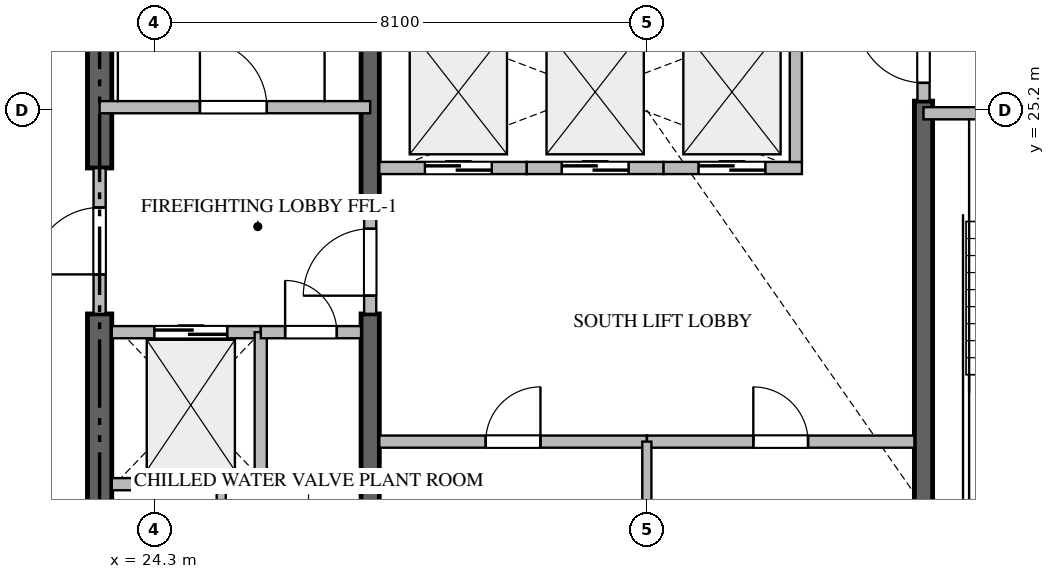
"""IFC4 building model, lengths in metres.
Left out: names, types, materials, properties, quantities, classifications, styles, units other than length and angle.
Written with IfcOpenShell. Run it as: python <this file> out.ifc"""

import sys

from ifc_helpers import new_model, si_unit, direction, frame, frame_2d, origin, place, context, subcontext, project, spatial, rectangle, extrude, source, transform, mapped, element, fill, save


model = new_model("IFC4")
c1 = context("Model", 3, precision=1e-05, world=origin(), true_north=direction((0.0, 1.0)))
c2 = subcontext(c1, "Body", "Model", "MODEL_VIEW")
j1 = project(units=[si_unit("LENGTHUNIT", "METRE"), si_unit("PLANEANGLEUNIT", "RADIAN")], contexts=[c1])
p1 = place(None, origin())
s1 = spatial("IfcSite", under=j1, at=p1, CompositionType="ELEMENT")
p2 = place(p1, origin())
s2 = spatial("IfcBuilding", under=s1, at=p2, CompositionType="ELEMENT")
p3 = place(p2, frame((0.0, 0.0, 157.65)))
s3 = spatial("IfcBuildingStorey", under=s2, at=p3, CompositionType="ELEMENT", Elevation=157.65)
p4 = place(p3, frame((23.4, 17.0, -0.26), z_axis=(0.0, 0.0, 1.0), x_axis=(0.0, 1.0, 0.0)))
e1 = element("IfcWall", 1, at=p4, inside=s3, PredefinedType="SHEAR", context=c2, shape_type="SweptSolid", body=[
    extrude(rectangle(XDim=4.85, YDim=0.4, at=frame_2d((2.425, 0.0))), origin(), (0.0, 0.0, 1.0), 3.748),
])
p5 = place(p3, frame((23.4, 24.25, -0.26), z_axis=(0.0, 0.0, 1.0), x_axis=(0.0, 1.0, 0.0)))
e2 = element("IfcWall", 2, at=p5, inside=s3, PredefinedType="SHEAR", context=c2, shape_type="SweptSolid", body=[
    extrude(rectangle(XDim=9.15, YDim=0.4, at=frame_2d((4.575, 0.0))), origin(), (0.0, 0.0, 1.0), 3.748),
])
p6 = place(p3, frame((27.85, 17.0, -0.26), z_axis=(0.0, 0.0, 1.0), x_axis=(0.0, 1.0, 0.0)))
e3 = element("IfcWall", 3, at=p6, inside=s3, PredefinedType="SHEAR", context=c2, shape_type="SweptSolid", body=[
    extrude(rectangle(XDim=4.85, YDim=0.3, at=frame_2d((2.425, 0.0))), origin(), (0.0, 0.0, 1.0), 3.748),
])
p7 = place(p3, frame((27.85, 23.55, -0.26), z_axis=(0.0, 0.0, 1.0), x_axis=(0.0, 1.0, 0.0)))
e4 = element("IfcWall", 4, at=p7, inside=s3, PredefinedType="SHEAR", context=c2, shape_type="SweptSolid", body=[
    extrude(rectangle(XDim=9.85, YDim=0.3, at=frame_2d((4.925, 0.0))), origin(), (0.0, 0.0, 1.0), 3.748),
])
p8 = place(p3, frame((36.95, 17.0, -0.26), z_axis=(0.0, 0.0, 1.0), x_axis=(0.0, 1.0, 0.0)))
e5 = element("IfcWall", 5, at=p8, inside=s3, PredefinedType="SHEAR", context=c2, shape_type="SweptSolid", body=[
    extrude(rectangle(XDim=8.35, YDim=0.3, at=frame_2d((4.175, 0.0))), origin(), (0.0, 0.0, 1.0), 3.748),
])
p9 = place(p3, frame((23.4, 25.25, 0.0), z_axis=(0.0, 0.0, 1.0), x_axis=(1.0, 0.0, 0.0)))
e6 = element("IfcWall", 6, at=p9, inside=s3, PredefinedType="STANDARD", context=c2, shape_type="SweptSolid", body=[
    extrude(rectangle(XDim=4.45, YDim=0.2, at=frame_2d((2.225, 0.0))), origin(), (0.0, 0.0, 1.0), 3.49),
])
p10 = place(p9, frame((1.65, 0.0, 0.0)))
e7 = element("IfcOpeningElement", 7, at=p10, cuts=e6, PredefinedType="OPENING", context=c2, shape_type="SweptSolid", body=[
    extrude(rectangle(XDim=1.1, YDim=2.15, at=frame_2d((0.55, 1.075))), frame((0.0, 0.11, 0.0), z_axis=(0.0, -1.0, 0.0), x_axis=(1.0, 0.0, 0.0)), (0.0, 0.0, 1.0), 0.22),
])
p11 = place(p3, frame((36.95, 25.15, 0.0), z_axis=(0.0, 0.0, 1.0), x_axis=(1.0, 0.0, 0.0)))
e8 = element("IfcWall", 8, at=p11, inside=s3, PredefinedType="STANDARD", context=c2, shape_type="SweptSolid", body=[
    extrude(rectangle(XDim=4.45, YDim=0.2, at=frame_2d((2.225, 0.0))), origin(), (0.0, 0.0, 1.0), 3.49),
])
p12 = place(p11, frame((1.65, 0.0, 0.0)))
e9 = element("IfcOpeningElement", 9, at=p12, cuts=e8, PredefinedType="OPENING", context=c2, shape_type="SweptSolid", body=[
    extrude(rectangle(XDim=1.1, YDim=2.15, at=frame_2d((0.55, 1.075))), frame((0.0, 0.11, 0.0), z_axis=(0.0, -1.0, 0.0), x_axis=(1.0, 0.0, 0.0)), (0.0, 0.0, 1.0), 0.22),
])
p13 = place(p3, frame((23.6, 21.55, 0.0), z_axis=(0.0, 0.0, 1.0), x_axis=(1.0, 0.0, 0.0)))
e10 = element("IfcWall", 10, at=p13, inside=s3, PredefinedType="STANDARD", context=c2, shape_type="SweptSolid", body=[
    extrude(rectangle(XDim=2.45, YDim=0.2, at=frame_2d((1.225, 0.0))), origin(), (0.0, 0.0, 1.0), 3.49),
])
p14 = place(p13, frame((0.7, 0.0, 0.0)))
e11 = element("IfcOpeningElement", 11, at=p14, cuts=e10, PredefinedType="OPENING", context=c2, shape_type="SweptSolid", body=[
    extrude(rectangle(XDim=1.2, YDim=2.2, at=frame_2d((0.6, 1.1))), frame((0.0, 0.11, 0.0), z_axis=(0.0, -1.0, 0.0), x_axis=(1.0, 0.0, 0.0)), (0.0, 0.0, 1.0), 0.22),
])
p15 = place(p3, frame((28.0, 24.25, 0.0), z_axis=(0.0, 0.0, 1.0), x_axis=(1.0, 0.0, 0.0)))
e12 = element("IfcWall", 12, at=p15, inside=s3, PredefinedType="STANDARD", context=c2, shape_type="SweptSolid", body=[
    extrude(rectangle(XDim=2.425, YDim=0.2, at=frame_2d((1.212, 0.0))), origin(), (0.0, 0.0, 1.0), 3.49),
])
p16 = place(p15, frame((0.75, 0.0, 0.0)))
e13 = element("IfcOpeningElement", 13, at=p16, cuts=e12, PredefinedType="OPENING", context=c2, shape_type="SweptSolid", body=[
    extrude(rectangle(XDim=1.1, YDim=2.2, at=frame_2d((0.55, 1.1))), frame((0.0, 0.11, 0.0), z_axis=(0.0, -1.0, 0.0), x_axis=(1.0, 0.0, 0.0)), (0.0, 0.0, 1.0), 0.22),
])
p17 = place(p3, frame((30.425, 24.25, 0.0), z_axis=(0.0, 0.0, 1.0), x_axis=(1.0, 0.0, 0.0)))
e14 = element("IfcWall", 14, at=p17, inside=s3, PredefinedType="STANDARD", context=c2, shape_type="SweptSolid", body=[
    extrude(rectangle(XDim=2.25, YDim=0.2, at=frame_2d((1.125, 0.0))), origin(), (0.0, 0.0, 1.0), 3.49),
])
p18 = place(p17, frame((0.575, 0.0, 0.0)))
e15 = element("IfcOpeningElement", 15, at=p18, cuts=e14, PredefinedType="OPENING", context=c2, shape_type="SweptSolid", body=[
    extrude(rectangle(XDim=1.1, YDim=2.2, at=frame_2d((0.55, 1.1))), frame((0.0, 0.11, 0.0), z_axis=(0.0, -1.0, 0.0), x_axis=(1.0, 0.0, 0.0)), (0.0, 0.0, 1.0), 0.22),
])
p19 = place(p3, frame((32.675, 24.25, 0.0), z_axis=(0.0, 0.0, 1.0), x_axis=(1.0, 0.0, 0.0)))
e16 = element("IfcWall", 16, at=p19, inside=s3, PredefinedType="STANDARD", context=c2, shape_type="SweptSolid", body=[
    extrude(rectangle(XDim=2.275, YDim=0.2, at=frame_2d((1.137, 0.0))), origin(), (0.0, 0.0, 1.0), 3.49),
])
p20 = place(p19, frame((0.575, 0.0, 0.0)))
e17 = element("IfcOpeningElement", 17, at=p20, cuts=e16, PredefinedType="OPENING", context=c2, shape_type="SweptSolid", body=[
    extrude(rectangle(XDim=1.1, YDim=2.2, at=frame_2d((0.55, 1.1))), frame((0.0, 0.11, 0.0), z_axis=(0.0, -1.0, 0.0), x_axis=(1.0, 0.0, 0.0)), (0.0, 0.0, 1.0), 0.22),
])
for number, where, z_axis, x_axis in (
    (18, (34.85, 24.35, 0.0), (0.0, 0.0, 1.0), (0.0, 1.0, 0.0)),
    (19, (26.05, 19.05, 0.0), (0.0, 0.0, 1.0), (0.0, 1.0, 0.0)),
):
    element("IfcWall", number, at=place(p3, frame(where, z_axis=z_axis, x_axis=x_axis)), inside=s3, PredefinedType="STANDARD", context=c2, shape_type="SweptSolid", body=[
        extrude(rectangle(XDim=2.5, YDim=0.2, at=frame_2d((1.25, 0.0))), origin(), (0.0, 0.0, 1.0), 3.49),
    ])
p21 = place(p3, frame((23.6, 19.05, 0.0), z_axis=(0.0, 0.0, 1.0), x_axis=(1.0, 0.0, 0.0)))
e20 = element("IfcWall", 20, at=p21, inside=s3, PredefinedType="STANDARD", context=c2, shape_type="SweptSolid", body=[
    extrude(rectangle(XDim=2.45, YDim=0.2, at=frame_2d((1.225, 0.0))), origin(), (0.0, 0.0, 1.0), 3.49),
])
p22 = place(p3, frame((26.052, 21.55, 0.0), z_axis=(0.0, 0.0, 1.0), x_axis=(1.0, 0.0, 0.0)))
e21 = element("IfcWall", 21, at=p22, inside=s3, PredefinedType="STANDARD", context=c2, shape_type="SweptSolid", body=[
    extrude(rectangle(XDim=1.648, YDim=0.2, at=frame_2d((0.824, 0.0))), origin(), (0.0, 0.0, 1.0), 3.49),
])
p23 = place(p22, frame((0.399, 0.0, 0.0)))
e22 = element("IfcOpeningElement", 22, at=p23, cuts=e21, PredefinedType="OPENING", context=c2, shape_type="SweptSolid", body=[
    extrude(rectangle(XDim=0.85, YDim=2.1, at=frame_2d((0.425, 1.05))), frame((0.0, 0.11, 0.0), z_axis=(0.0, -1.0, 0.0), x_axis=(1.0, 0.0, 0.0)), (0.0, 0.0, 1.0), 0.22),
])
p24 = place(p3, frame((23.4, 21.852, 0.0), z_axis=(0.0, 0.0, 1.0), x_axis=(0.0, 1.0, 0.0)))
e23 = element("IfcWall", 23, at=p24, inside=s3, PredefinedType="STANDARD", context=c2, shape_type="SweptSolid", body=[
    extrude(rectangle(XDim=2.396, YDim=0.2, at=frame_2d((1.198, 0.0))), origin(), (0.0, 0.0, 1.0), 3.49),
])
p25 = place(p24, frame((0.648, 0.0, 0.0)))
e24 = element("IfcOpeningElement", 24, at=p25, cuts=e23, PredefinedType="OPENING", context=c2, shape_type="SweptSolid", body=[
    extrude(rectangle(XDim=1.1, YDim=2.15, at=frame_2d((0.55, 1.075))), frame((0.0, 0.11, 0.0), z_axis=(0.0, -1.0, 0.0), x_axis=(1.0, 0.0, 0.0)), (0.0, 0.0, 1.0), 0.22),
])
p26 = place(p3, frame((27.85, 21.852, 0.0), z_axis=(0.0, 0.0, 1.0), x_axis=(0.0, 1.0, 0.0)))
e25 = element("IfcWall", 25, at=p26, inside=s3, PredefinedType="STANDARD", context=c2, shape_type="SweptSolid", body=[
    extrude(rectangle(XDim=1.696, YDim=0.2, at=frame_2d((0.848, 0.0))), origin(), (0.0, 0.0, 1.0), 3.49),
])
p27 = place(p26, frame((0.298, 0.0, 0.0)))
e26 = element("IfcOpeningElement", 26, at=p27, cuts=e25, PredefinedType="OPENING", context=c2, shape_type="SweptSolid", body=[
    extrude(rectangle(XDim=1.1, YDim=2.15, at=frame_2d((0.55, 1.075))), frame((0.0, 0.11, 0.0), z_axis=(0.0, -1.0, 0.0), x_axis=(1.0, 0.0, 0.0)), (0.0, 0.0, 1.0), 0.22),
])
p28 = place(p3, frame((36.95, 25.352, 0.0), z_axis=(0.0, 0.0, 1.0), x_axis=(0.0, 1.0, 0.0)))
e27 = element("IfcWall", 27, at=p28, inside=s3, PredefinedType="STANDARD", context=c2, shape_type="SweptSolid", body=[
    extrude(rectangle(XDim=1.696, YDim=0.2, at=frame_2d((0.848, 0.0))), origin(), (0.0, 0.0, 1.0), 3.49),
])
p29 = place(p28, frame((0.298, 0.0, 0.0)))
e28 = element("IfcOpeningElement", 28, at=p29, cuts=e27, PredefinedType="OPENING", context=c2, shape_type="SweptSolid", body=[
    extrude(rectangle(XDim=1.1, YDim=2.15, at=frame_2d((0.55, 1.075))), frame((0.0, 0.11, 0.0), z_axis=(0.0, -1.0, 0.0), x_axis=(1.0, 0.0, 0.0)), (0.0, 0.0, 1.0), 0.22),
])
p30 = place(p3, frame((25.4, 17.0, 0.0), z_axis=(0.0, 0.0, 1.0), x_axis=(0.0, 1.0, 0.0)))
e29 = element("IfcWall", 29, at=p30, inside=s3, PredefinedType="PARTITIONING", context=c2, shape_type="SweptSolid", body=[
    extrude(rectangle(XDim=2.05, YDim=0.15, at=frame_2d((1.025, 0.0))), origin(), (0.0, 0.0, 1.0), 3.49),
])
p31 = place(p30, frame((0.6, 0.0, 0.0)))
e30 = element("IfcOpeningElement", 30, at=p31, cuts=e29, PredefinedType="OPENING", context=c2, shape_type="SweptSolid", body=[
    extrude(rectangle(XDim=0.85, YDim=2.1, at=frame_2d((0.425, 1.05))), frame((0.0, 0.085, 0.0), z_axis=(0.0, -1.0, 0.0), x_axis=(1.0, 0.0, 0.0)), (0.0, 0.0, 1.0), 0.17),
])
p32 = place(p3, frame((28.0, 19.75, 0.0), z_axis=(0.0, 0.0, 1.0), x_axis=(1.0, 0.0, 0.0)))
e31 = element("IfcWall", 31, at=p32, inside=s3, PredefinedType="STANDARD", context=c2, shape_type="SweptSolid", body=[
    extrude(rectangle(XDim=4.4, YDim=0.2, at=frame_2d((2.2, 0.0))), origin(), (0.0, 0.0, 1.0), 3.49),
])
p33 = place(p32, frame((1.75, 0.0, 0.0)))
e32 = element("IfcOpeningElement", 32, at=p33, cuts=e31, PredefinedType="OPENING", context=c2, shape_type="SweptSolid", body=[
    extrude(rectangle(XDim=0.9, YDim=2.1, at=frame_2d((0.45, 1.05))), frame((0.0, 0.11, 0.0), z_axis=(0.0, -1.0, 0.0), x_axis=(1.0, 0.0, 0.0)), (0.0, 0.0, 1.0), 0.22),
])
p34 = place(p3, frame((32.402, 19.75, 0.0), z_axis=(0.0, 0.0, 1.0), x_axis=(1.0, 0.0, 0.0)))
e33 = element("IfcWall", 33, at=p34, inside=s3, PredefinedType="STANDARD", context=c2, shape_type="SweptSolid", body=[
    extrude(rectangle(XDim=4.398, YDim=0.2, at=frame_2d((2.199, 0.0))), origin(), (0.0, 0.0, 1.0), 3.49),
])
p35 = place(p34, frame((1.749, 0.0, 0.0)))
e34 = element("IfcOpeningElement", 34, at=p35, cuts=e33, PredefinedType="OPENING", context=c2, shape_type="SweptSolid", body=[
    extrude(rectangle(XDim=0.9, YDim=2.1, at=frame_2d((0.45, 1.05))), frame((0.0, 0.11, 0.0), z_axis=(0.0, -1.0, 0.0), x_axis=(1.0, 0.0, 0.0)), (0.0, 0.0, 1.0), 0.22),
])
p36 = place(p3, frame((32.4, 17.02, 0.0), z_axis=(0.0, 0.0, 1.0), x_axis=(0.0, 1.0, 0.0)))
e35 = element("IfcWall", 35, at=p36, inside=s3, PredefinedType="PARTITIONING", context=c2, shape_type="SweptSolid", body=[
    extrude(rectangle(XDim=2.73, YDim=0.15, at=frame_2d((1.365, 0.0))), origin(), (0.0, 0.0, 1.0), 3.49),
])
m1 = source(origin(), c2, "Body", "SweptSolid", [
    extrude(rectangle(XDim=1.1, YDim=2.15, at=frame_2d((0.55, 1.075))), frame((0.0, 0.025, 0.0), z_axis=(0.0, -1.0, 0.0), x_axis=(1.0, 0.0, 0.0)), (0.0, 0.0, 1.0), 0.05),
])
p37 = place(p10, origin())
e36 = element("IfcDoor", 36, at=p37, inside=s3, OperationType="SINGLE_SWING_LEFT", PredefinedType="DOOR", context=c2, shape_type="MappedRepresentation", body=[
    mapped(m1, transform((0.0, 0.0, 0.0), scale=1.0)),
])
fill(e7, e36)
m2 = source(origin(), c2, "Body", "SweptSolid", [
    extrude(rectangle(XDim=1.2, YDim=2.2, at=frame_2d((0.6, 1.1))), frame((0.0, 0.025, 0.0), z_axis=(0.0, -1.0, 0.0), x_axis=(1.0, 0.0, 0.0)), (0.0, 0.0, 1.0), 0.05),
])
p38 = place(p14, origin())
e37 = element("IfcDoor", 37, at=p38, inside=s3, OperationType="DOUBLE_DOOR_SLIDING", PredefinedType="DOOR", context=c2, shape_type="MappedRepresentation", body=[
    mapped(m2, transform((0.0, 0.0, 0.0), scale=1.0)),
])
fill(e11, e37)
m3 = source(origin(), c2, "Body", "SweptSolid", [
    extrude(rectangle(XDim=1.1, YDim=2.2, at=frame_2d((0.55, 1.1))), frame((0.0, 0.025, 0.0), z_axis=(0.0, -1.0, 0.0), x_axis=(1.0, 0.0, 0.0)), (0.0, 0.0, 1.0), 0.05),
])
p39 = place(p16, origin())
e38 = element("IfcDoor", 38, at=p39, inside=s3, OperationType="DOUBLE_DOOR_SLIDING", PredefinedType="DOOR", context=c2, shape_type="MappedRepresentation", body=[
    mapped(m3, transform((0.0, 0.0, 0.0), scale=1.0)),
])
fill(e13, e38)
p40 = place(p18, origin())
e39 = element("IfcDoor", 39, at=p40, inside=s3, OperationType="DOUBLE_DOOR_SLIDING", PredefinedType="DOOR", context=c2, shape_type="MappedRepresentation", body=[
    mapped(m3, transform((0.0, 0.0, 0.0), scale=1.0)),
])
fill(e15, e39)
p41 = place(p20, origin())
e40 = element("IfcDoor", 40, at=p41, inside=s3, OperationType="DOUBLE_DOOR_SLIDING", PredefinedType="DOOR", context=c2, shape_type="MappedRepresentation", body=[
    mapped(m3, transform((0.0, 0.0, 0.0), scale=1.0)),
])
fill(e17, e40)
m4 = source(origin(), c2, "Body", "SweptSolid", [
    extrude(rectangle(XDim=0.85, YDim=2.1, at=frame_2d((0.425, 1.05))), frame((0.0, 0.025, 0.0), z_axis=(0.0, -1.0, 0.0), x_axis=(1.0, 0.0, 0.0)), (0.0, 0.0, 1.0), 0.05),
])
p42 = place(p23, origin())
e41 = element("IfcDoor", 41, at=p42, inside=s3, OperationType="SINGLE_SWING_LEFT", PredefinedType="DOOR", context=c2, shape_type="MappedRepresentation", body=[
    mapped(m4, transform((0.0, 0.0, 0.0), scale=1.0)),
])
fill(e22, e41)
p43 = place(p25, origin())
e42 = element("IfcDoor", 42, at=p43, inside=s3, OperationType="SINGLE_SWING_LEFT", PredefinedType="DOOR", context=c2, shape_type="MappedRepresentation", body=[
    mapped(m1, transform((0.0, 0.0, 0.0), scale=1.0)),
])
fill(e24, e42)
p44 = place(p27, origin())
e43 = element("IfcDoor", 43, at=p44, inside=s3, OperationType="SINGLE_SWING_LEFT", PredefinedType="DOOR", context=c2, shape_type="MappedRepresentation", body=[
    mapped(m1, transform((0.0, 0.0, 0.0), scale=1.0)),
])
fill(e26, e43)
p45 = place(p29, origin())
e44 = element("IfcDoor", 44, at=p45, inside=s3, OperationType="SINGLE_SWING_RIGHT", PredefinedType="DOOR", context=c2, shape_type="MappedRepresentation", body=[
    mapped(m1, transform((0.0, 0.0, 0.0), scale=1.0)),
])
fill(e28, e44)
m5 = source(origin(), c2, "Body", "SweptSolid", [
    extrude(rectangle(XDim=0.9, YDim=2.1, at=frame_2d((0.45, 1.05))), frame((0.0, 0.025, 0.0), z_axis=(0.0, -1.0, 0.0), x_axis=(1.0, 0.0, 0.0)), (0.0, 0.0, 1.0), 0.05),
])
p46 = place(p33, origin())
e45 = element("IfcDoor", 45, at=p46, inside=s3, OperationType="SINGLE_SWING_RIGHT", PredefinedType="DOOR", context=c2, shape_type="MappedRepresentation", body=[
    mapped(m5, transform((0.0, 0.0, 0.0), scale=1.0)),
])
fill(e32, e45)
p47 = place(p35, origin())
e46 = element("IfcDoor", 46, at=p47, inside=s3, OperationType="SINGLE_SWING_LEFT", PredefinedType="DOOR", context=c2, shape_type="MappedRepresentation", body=[
    mapped(m5, transform((0.0, 0.0, 0.0), scale=1.0)),
])
fill(e34, e46)
save(model, sys.argv[1])
